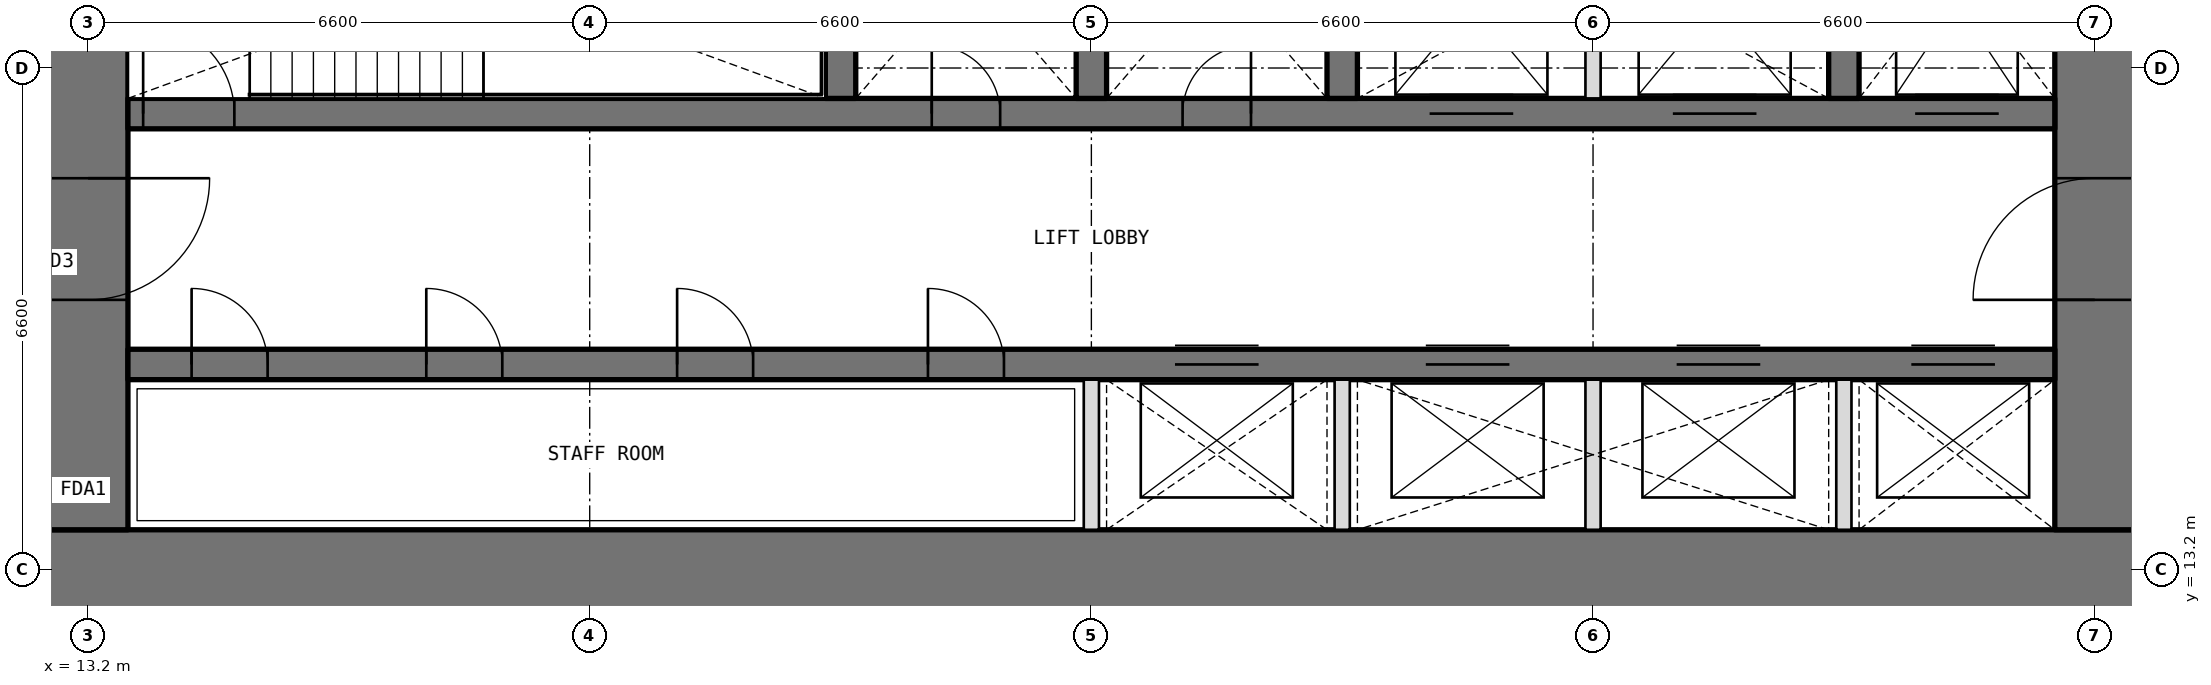
"""IFC4 building model, lengths in metres.
Left out: names, types, materials, properties, quantities, classifications, styles, units other than length and angle.
Written with IfcOpenShell. Run it as: python <this file> out.ifc"""

import sys

from ifc_helpers import new_model, si_unit, direction, frame, frame_2d, origin, place, context, subcontext, project, spatial, rectangle, extrude, element, fill, save


model = new_model("IFC4")
c1 = context("Model", 3, precision=1e-05, world=origin(), true_north=direction((0.0, 1.0)))
c2 = subcontext(c1, "Body", "Model", "MODEL_VIEW")
j1 = project(units=[si_unit("LENGTHUNIT", "METRE"), si_unit("PLANEANGLEUNIT", "RADIAN")], contexts=[c1])
p1 = place(None, origin())
s1 = spatial("IfcSite", under=j1, at=p1, CompositionType="ELEMENT")
p2 = place(p1, origin())
s2 = spatial("IfcBuilding", under=s1, at=p2, CompositionType="ELEMENT")
p3 = place(p2, frame((0.0, 0.0, 141.0)))
s3 = spatial("IfcBuildingStorey", under=s2, at=p3, CompositionType="ELEMENT", Elevation=141.0)
p4 = place(p3, frame((12.675, 13.2, 0.0), z_axis=(0.0, 0.0, 1.0), x_axis=(1.0, 0.0, 0.0)))
e1 = element("IfcWall", 1, at=p4, inside=s3, PredefinedType="SHEAR", context=c2, shape_type="SweptSolid", body=[
    extrude(rectangle(XDim=27.45, YDim=1.05, at=frame_2d((13.725, 0.0))), origin(), (0.0, 0.0, 1.0), 4.2),
])
p5 = place(p3, frame((39.6, 13.725, 0.0), z_axis=(0.0, 0.0, 1.0), x_axis=(0.0, 1.0, 0.0)))
e2 = element("IfcWall", 2, at=p5, inside=s3, PredefinedType="SHEAR", context=c2, shape_type="SweptSolid", body=[
    extrude(rectangle(XDim=18.75, YDim=1.05, at=frame_2d((9.375, 0.0))), origin(), (0.0, 0.0, 1.0), 4.2),
])
p6 = place(p5, frame((3.025, 0.0, 0.0)))
e3 = element("IfcOpeningElement", 3, at=p6, cuts=e2, PredefinedType="OPENING", context=c2, shape_type="SweptSolid", body=[
    extrude(rectangle(XDim=1.6, YDim=2.1, at=frame_2d((0.8, 1.05))), frame((0.0, 0.535, 0.0), z_axis=(0.0, -1.0, 0.0), x_axis=(1.0, 0.0, 0.0)), (0.0, 0.0, 1.0), 1.07),
])
p7 = place(p5, frame((13.825, 0.0, 0.0)))
e4 = element("IfcOpeningElement", 4, at=p7, cuts=e2, PredefinedType="OPENING", context=c2, shape_type="SweptSolid", body=[
    extrude(rectangle(XDim=1.6, YDim=2.1, at=frame_2d((0.8, 1.05))), frame((0.0, 0.535, 0.0), z_axis=(0.0, -1.0, 0.0), x_axis=(1.0, 0.0, 0.0)), (0.0, 0.0, 1.0), 1.07),
])
p8 = place(p3, frame((13.2, 32.475, 0.0), z_axis=(0.0, 0.0, 1.0), x_axis=(0.0, -1.0, 0.0)))
e5 = element("IfcWall", 5, at=p8, inside=s3, PredefinedType="SHEAR", context=c2, shape_type="SweptSolid", body=[
    extrude(rectangle(XDim=18.75, YDim=1.05, at=frame_2d((9.375, 0.0))), origin(), (0.0, 0.0, 1.0), 4.2),
])
p9 = place(p8, frame((14.125, 0.0, 0.0)))
e6 = element("IfcOpeningElement", 6, at=p9, cuts=e5, PredefinedType="OPENING", context=c2, shape_type="SweptSolid", body=[
    extrude(rectangle(XDim=1.6, YDim=2.1, at=frame_2d((0.8, 1.05))), frame((0.0, 0.535, 0.0), z_axis=(0.0, -1.0, 0.0), x_axis=(1.0, 0.0, 0.0)), (0.0, 0.0, 1.0), 1.07),
])
p10 = place(p8, frame((3.325, 0.0, 0.0)))
e7 = element("IfcOpeningElement", 7, at=p10, cuts=e5, PredefinedType="OPENING", context=c2, shape_type="SweptSolid", body=[
    extrude(rectangle(XDim=1.6, YDim=2.1, at=frame_2d((0.8, 1.05))), frame((0.0, 0.535, 0.0), z_axis=(0.0, -1.0, 0.0), x_axis=(1.0, 0.0, 0.0)), (0.0, 0.0, 1.0), 1.07),
])
p11 = place(p3, frame((13.725, 15.9, 0.0), z_axis=(0.0, 0.0, 1.0), x_axis=(1.0, 0.0, 0.0)))
e8 = element("IfcWall", 8, at=p11, inside=s3, PredefinedType="SHEAR", context=c2, shape_type="SweptSolid", body=[
    extrude(rectangle(XDim=25.35, YDim=0.4, at=frame_2d((12.675, 0.0))), origin(), (0.0, 0.0, 1.0), 4.2),
])
p12 = place(p11, frame((0.837, 0.0, 0.0)))
e9 = element("IfcOpeningElement", 9, at=p12, cuts=e8, PredefinedType="OPENING", context=c2, shape_type="SweptSolid", body=[
    extrude(rectangle(XDim=1.0, YDim=2.1, at=frame_2d((0.5, 1.05))), frame((0.0, 0.21, 0.0), z_axis=(0.0, -1.0, 0.0), x_axis=(1.0, 0.0, 0.0)), (0.0, 0.0, 1.0), 0.42),
])
p13 = place(p11, frame((3.925, 0.0, 0.0)))
e10 = element("IfcOpeningElement", 10, at=p13, cuts=e8, PredefinedType="OPENING", context=c2, shape_type="SweptSolid", body=[
    extrude(rectangle(XDim=1.0, YDim=2.1, at=frame_2d((0.5, 1.05))), frame((0.0, 0.21, 0.0), z_axis=(0.0, -1.0, 0.0), x_axis=(1.0, 0.0, 0.0)), (0.0, 0.0, 1.0), 0.42),
])
p14 = place(p11, frame((7.225, 0.0, 0.0)))
e11 = element("IfcOpeningElement", 11, at=p14, cuts=e8, PredefinedType="OPENING", context=c2, shape_type="SweptSolid", body=[
    extrude(rectangle(XDim=1.0, YDim=2.1, at=frame_2d((0.5, 1.05))), frame((0.0, 0.21, 0.0), z_axis=(0.0, -1.0, 0.0), x_axis=(1.0, 0.0, 0.0)), (0.0, 0.0, 1.0), 0.42),
])
p15 = place(p11, frame((10.525, 0.0, 0.0)))
e12 = element("IfcOpeningElement", 12, at=p15, cuts=e8, PredefinedType="OPENING", context=c2, shape_type="SweptSolid", body=[
    extrude(rectangle(XDim=1.0, YDim=2.1, at=frame_2d((0.5, 1.05))), frame((0.0, 0.21, 0.0), z_axis=(0.0, -1.0, 0.0), x_axis=(1.0, 0.0, 0.0)), (0.0, 0.0, 1.0), 0.42),
])
p16 = place(p11, frame((13.775, 0.0, 0.0)))
e13 = element("IfcOpeningElement", 13, at=p16, cuts=e8, PredefinedType="OPENING", context=c2, shape_type="SweptSolid", body=[
    extrude(rectangle(XDim=1.1, YDim=2.1, at=frame_2d((0.55, 1.05))), frame((0.0, 0.21, 0.0), z_axis=(0.0, -1.0, 0.0), x_axis=(1.0, 0.0, 0.0)), (0.0, 0.0, 1.0), 0.42),
])
p17 = place(p11, frame((17.075, 0.0, 0.0)))
e14 = element("IfcOpeningElement", 14, at=p17, cuts=e8, PredefinedType="OPENING", context=c2, shape_type="SweptSolid", body=[
    extrude(rectangle(XDim=1.1, YDim=2.1, at=frame_2d((0.55, 1.05))), frame((0.0, 0.21, 0.0), z_axis=(0.0, -1.0, 0.0), x_axis=(1.0, 0.0, 0.0)), (0.0, 0.0, 1.0), 0.42),
])
p18 = place(p11, frame((20.375, 0.0, 0.0)))
e15 = element("IfcOpeningElement", 15, at=p18, cuts=e8, PredefinedType="OPENING", context=c2, shape_type="SweptSolid", body=[
    extrude(rectangle(XDim=1.1, YDim=2.1, at=frame_2d((0.55, 1.05))), frame((0.0, 0.21, 0.0), z_axis=(0.0, -1.0, 0.0), x_axis=(1.0, 0.0, 0.0)), (0.0, 0.0, 1.0), 0.42),
])
p19 = place(p11, frame((23.462, 0.0, 0.0)))
e16 = element("IfcOpeningElement", 16, at=p19, cuts=e8, PredefinedType="OPENING", context=c2, shape_type="SweptSolid", body=[
    extrude(rectangle(XDim=1.1, YDim=2.1, at=frame_2d((0.55, 1.05))), frame((0.0, 0.21, 0.0), z_axis=(0.0, -1.0, 0.0), x_axis=(1.0, 0.0, 0.0)), (0.0, 0.0, 1.0), 0.42),
])
p20 = place(p3, frame((13.725, 19.2, 0.0), z_axis=(0.0, 0.0, 1.0), x_axis=(1.0, 0.0, 0.0)))
e17 = element("IfcWall", 17, at=p20, inside=s3, PredefinedType="SHEAR", context=c2, shape_type="SweptSolid", body=[
    extrude(rectangle(XDim=25.35, YDim=0.4, at=frame_2d((12.675, 0.0))), origin(), (0.0, 0.0, 1.0), 4.2),
])
p21 = place(p20, frame((10.575, 0.0, 0.0)))
e18 = element("IfcOpeningElement", 18, at=p21, cuts=e17, PredefinedType="OPENING", context=c2, shape_type="SweptSolid", body=[
    extrude(rectangle(XDim=0.9, YDim=2.1, at=frame_2d((0.45, 1.05))), frame((0.0, 0.21, 0.0), z_axis=(0.0, -1.0, 0.0), x_axis=(1.0, 0.0, 0.0)), (0.0, 0.0, 1.0), 0.42),
])
p22 = place(p20, frame((13.875, 0.0, 0.0)))
e19 = element("IfcOpeningElement", 19, at=p22, cuts=e17, PredefinedType="OPENING", context=c2, shape_type="SweptSolid", body=[
    extrude(rectangle(XDim=0.9, YDim=2.1, at=frame_2d((0.45, 1.05))), frame((0.0, 0.21, 0.0), z_axis=(0.0, -1.0, 0.0), x_axis=(1.0, 0.0, 0.0)), (0.0, 0.0, 1.0), 0.42),
])
p23 = place(p20, frame((0.2, 0.0, 0.0)))
e20 = element("IfcOpeningElement", 20, at=p23, cuts=e17, PredefinedType="OPENING", context=c2, shape_type="SweptSolid", body=[
    extrude(rectangle(XDim=1.2, YDim=2.1, at=frame_2d((0.6, 1.05))), frame((0.0, 0.21, 0.0), z_axis=(0.0, -1.0, 0.0), x_axis=(1.0, 0.0, 0.0)), (0.0, 0.0, 1.0), 0.42),
])
p24 = place(p20, frame((23.512, 0.0, 0.0)))
e21 = element("IfcOpeningElement", 21, at=p24, cuts=e17, PredefinedType="OPENING", context=c2, shape_type="SweptSolid", body=[
    extrude(rectangle(XDim=1.1, YDim=2.1, at=frame_2d((0.55, 1.05))), frame((0.0, 0.21, 0.0), z_axis=(0.0, -1.0, 0.0), x_axis=(1.0, 0.0, 0.0)), (0.0, 0.0, 1.0), 0.42),
])
p25 = place(p20, frame((17.125, 0.0, 0.0)))
e22 = element("IfcOpeningElement", 22, at=p25, cuts=e17, PredefinedType="OPENING", context=c2, shape_type="SweptSolid", body=[
    extrude(rectangle(XDim=1.1, YDim=2.1, at=frame_2d((0.55, 1.05))), frame((0.0, 0.21, 0.0), z_axis=(0.0, -1.0, 0.0), x_axis=(1.0, 0.0, 0.0)), (0.0, 0.0, 1.0), 0.42),
])
p26 = place(p20, frame((20.325, 0.0, 0.0)))
e23 = element("IfcOpeningElement", 23, at=p26, cuts=e17, PredefinedType="OPENING", context=c2, shape_type="SweptSolid", body=[
    extrude(rectangle(XDim=1.1, YDim=2.1, at=frame_2d((0.55, 1.05))), frame((0.0, 0.21, 0.0), z_axis=(0.0, -1.0, 0.0), x_axis=(1.0, 0.0, 0.0)), (0.0, 0.0, 1.0), 0.42),
])
for number, where, z_axis, x_axis in (
    (24, (23.1, 19.4, 0.0), (0.0, 0.0, 1.0), (0.0, 1.0, 0.0)),
    (25, (26.4, 19.4, 0.0), (0.0, 0.0, 1.0), (0.0, 1.0, 0.0)),
    (26, (29.7, 19.4, 0.0), (0.0, 0.0, 1.0), (0.0, 1.0, 0.0)),
    (27, (36.3, 19.4, 0.0), (0.0, 0.0, 1.0), (0.0, 1.0, 0.0)),
):
    element("IfcWall", number, at=place(p3, frame(where, z_axis=z_axis, x_axis=x_axis)), inside=s3, PredefinedType="SHEAR", context=c2, shape_type="SweptSolid", body=[
        extrude(rectangle(XDim=3.35, YDim=0.4, at=frame_2d((1.675, 0.0))), origin(), (0.0, 0.0, 1.0), 4.2),
    ])
for number, where, z_axis, x_axis in (
    (28, (26.4, 13.725, 0.0), (0.0, 0.0, 1.0), (0.0, 1.0, 0.0)),
    (29, (29.7, 13.725, 0.0), (0.0, 0.0, 1.0), (0.0, 1.0, 0.0)),
    (30, (33.0, 13.725, 0.0), (0.0, 0.0, 1.0), (0.0, 1.0, 0.0)),
    (31, (36.3, 13.725, 0.0), (0.0, 0.0, 1.0), (0.0, 1.0, 0.0)),
):
    element("IfcWall", number, at=place(p3, frame(where, z_axis=z_axis, x_axis=x_axis)), inside=s3, PredefinedType="PARTITIONING", context=c2, shape_type="SweptSolid", body=[
        extrude(rectangle(XDim=1.975, YDim=0.2, at=frame_2d((0.987, 0.0))), origin(), (0.0, 0.0, 1.0), 4.2),
    ])
p27 = place(p3, frame((33.0, 19.4, 0.0), z_axis=(0.0, 0.0, 1.0), x_axis=(0.0, 1.0, 0.0)))
e32 = element("IfcWall", 32, at=p27, inside=s3, PredefinedType="PARTITIONING", context=c2, shape_type="SweptSolid", body=[
    extrude(rectangle(XDim=3.35, YDim=0.2, at=frame_2d((1.675, 0.0))), origin(), (0.0, 0.0, 1.0), 4.2),
])
p28 = place(p21, origin())
e33 = element("IfcDoor", 33, at=p28, inside=s3, OperationType="SINGLE_SWING_LEFT", PredefinedType="DOOR", context=c2, shape_type="SweptSolid", body=[
    extrude(rectangle(XDim=0.9, YDim=2.1, at=frame_2d((0.45, 1.05))), frame((0.0, 0.025, 0.0), z_axis=(0.0, -1.0, 0.0), x_axis=(1.0, 0.0, 0.0)), (0.0, 0.0, 1.0), 0.05),
])
fill(e18, e33)
p29 = place(p22, origin())
e34 = element("IfcDoor", 34, at=p29, inside=s3, OperationType="SINGLE_SWING_RIGHT", PredefinedType="DOOR", context=c2, shape_type="SweptSolid", body=[
    extrude(rectangle(XDim=0.9, YDim=2.1, at=frame_2d((0.45, 1.05))), frame((0.0, 0.025, 0.0), z_axis=(0.0, -1.0, 0.0), x_axis=(1.0, 0.0, 0.0)), (0.0, 0.0, 1.0), 0.05),
])
fill(e19, e34)
p30 = place(p12, origin())
e35 = element("IfcDoor", 35, at=p30, inside=s3, OperationType="SINGLE_SWING_LEFT", PredefinedType="DOOR", context=c2, shape_type="SweptSolid", body=[
    extrude(rectangle(XDim=1.0, YDim=2.1, at=frame_2d((0.5, 1.05))), frame((0.0, 0.025, 0.0), z_axis=(0.0, -1.0, 0.0), x_axis=(1.0, 0.0, 0.0)), (0.0, 0.0, 1.0), 0.05),
])
fill(e9, e35)
p31 = place(p13, origin())
e36 = element("IfcDoor", 36, at=p31, inside=s3, OperationType="SINGLE_SWING_LEFT", PredefinedType="DOOR", context=c2, shape_type="SweptSolid", body=[
    extrude(rectangle(XDim=1.0, YDim=2.1, at=frame_2d((0.5, 1.05))), frame((0.0, 0.025, 0.0), z_axis=(0.0, -1.0, 0.0), x_axis=(1.0, 0.0, 0.0)), (0.0, 0.0, 1.0), 0.05),
])
fill(e10, e36)
p32 = place(p14, origin())
e37 = element("IfcDoor", 37, at=p32, inside=s3, OperationType="SINGLE_SWING_LEFT", PredefinedType="DOOR", context=c2, shape_type="SweptSolid", body=[
    extrude(rectangle(XDim=1.0, YDim=2.1, at=frame_2d((0.5, 1.05))), frame((0.0, 0.025, 0.0), z_axis=(0.0, -1.0, 0.0), x_axis=(1.0, 0.0, 0.0)), (0.0, 0.0, 1.0), 0.05),
])
fill(e11, e37)
p33 = place(p15, origin())
e38 = element("IfcDoor", 38, at=p33, inside=s3, OperationType="SINGLE_SWING_LEFT", PredefinedType="DOOR", context=c2, shape_type="SweptSolid", body=[
    extrude(rectangle(XDim=1.0, YDim=2.1, at=frame_2d((0.5, 1.05))), frame((0.0, 0.025, 0.0), z_axis=(0.0, -1.0, 0.0), x_axis=(1.0, 0.0, 0.0)), (0.0, 0.0, 1.0), 0.05),
])
fill(e12, e38)
p34 = place(p23, origin())
e39 = element("IfcDoor", 39, at=p34, inside=s3, OperationType="SINGLE_SWING_LEFT", PredefinedType="DOOR", context=c2, shape_type="SweptSolid", body=[
    extrude(rectangle(XDim=1.2, YDim=2.1, at=frame_2d((0.6, 1.05))), frame((0.0, 0.025, 0.0), z_axis=(0.0, -1.0, 0.0), x_axis=(1.0, 0.0, 0.0)), (0.0, 0.0, 1.0), 0.05),
])
fill(e20, e39)
p35 = place(p9, origin())
e40 = element("IfcDoor", 40, at=p35, inside=s3, OperationType="DOUBLE_DOOR_DOUBLE_SWING", PredefinedType="DOOR", context=c2, shape_type="SweptSolid", body=[
    extrude(rectangle(XDim=1.6, YDim=2.1, at=frame_2d((0.8, 1.05))), frame((0.0, 0.025, 0.0), z_axis=(0.0, -1.0, 0.0), x_axis=(1.0, 0.0, 0.0)), (0.0, 0.0, 1.0), 0.05),
])
fill(e6, e40)
p36 = place(p6, origin())
e41 = element("IfcDoor", 41, at=p36, inside=s3, OperationType="DOUBLE_DOOR_DOUBLE_SWING", PredefinedType="DOOR", context=c2, shape_type="SweptSolid", body=[
    extrude(rectangle(XDim=1.6, YDim=2.1, at=frame_2d((0.8, 1.05))), frame((0.0, 0.025, 0.0), z_axis=(0.0, -1.0, 0.0), x_axis=(1.0, 0.0, 0.0)), (0.0, 0.0, 1.0), 0.05),
])
fill(e3, e41)
p37 = place(p16, origin())
e42 = element("IfcDoor", 42, at=p37, inside=s3, OperationType="DOUBLE_DOOR_SLIDING", PredefinedType="DOOR", context=c2, shape_type="SweptSolid", body=[
    extrude(rectangle(XDim=1.1, YDim=2.1, at=frame_2d((0.55, 1.05))), frame((0.0, 0.025, 0.0), z_axis=(0.0, -1.0, 0.0), x_axis=(1.0, 0.0, 0.0)), (0.0, 0.0, 1.0), 0.05),
])
fill(e13, e42)
p38 = place(p17, origin())
e43 = element("IfcDoor", 43, at=p38, inside=s3, OperationType="DOUBLE_DOOR_SLIDING", PredefinedType="DOOR", context=c2, shape_type="SweptSolid", body=[
    extrude(rectangle(XDim=1.1, YDim=2.1, at=frame_2d((0.55, 1.05))), frame((0.0, 0.025, 0.0), z_axis=(0.0, -1.0, 0.0), x_axis=(1.0, 0.0, 0.0)), (0.0, 0.0, 1.0), 0.05),
])
fill(e14, e43)
p39 = place(p18, origin())
e44 = element("IfcDoor", 44, at=p39, inside=s3, OperationType="DOUBLE_DOOR_SLIDING", PredefinedType="DOOR", context=c2, shape_type="SweptSolid", body=[
    extrude(rectangle(XDim=1.1, YDim=2.1, at=frame_2d((0.55, 1.05))), frame((0.0, 0.025, 0.0), z_axis=(0.0, -1.0, 0.0), x_axis=(1.0, 0.0, 0.0)), (0.0, 0.0, 1.0), 0.05),
])
fill(e15, e44)
p40 = place(p19, origin())
e45 = element("IfcDoor", 45, at=p40, inside=s3, OperationType="DOUBLE_DOOR_SLIDING", PredefinedType="DOOR", context=c2, shape_type="SweptSolid", body=[
    extrude(rectangle(XDim=1.1, YDim=2.1, at=frame_2d((0.55, 1.05))), frame((0.0, 0.025, 0.0), z_axis=(0.0, -1.0, 0.0), x_axis=(1.0, 0.0, 0.0)), (0.0, 0.0, 1.0), 0.05),
])
fill(e16, e45)
p41 = place(p24, origin())
e46 = element("IfcDoor", 46, at=p41, inside=s3, OperationType="DOUBLE_DOOR_SLIDING", PredefinedType="DOOR", context=c2, shape_type="SweptSolid", body=[
    extrude(rectangle(XDim=1.1, YDim=2.1, at=frame_2d((0.55, 1.05))), frame((0.0, 0.025, 0.0), z_axis=(0.0, -1.0, 0.0), x_axis=(1.0, 0.0, 0.0)), (0.0, 0.0, 1.0), 0.05),
])
fill(e21, e46)
p42 = place(p25, origin())
e47 = element("IfcDoor", 47, at=p42, inside=s3, OperationType="DOUBLE_DOOR_SLIDING", PredefinedType="DOOR", context=c2, shape_type="SweptSolid", body=[
    extrude(rectangle(XDim=1.1, YDim=2.1, at=frame_2d((0.55, 1.05))), frame((0.0, 0.025, 0.0), z_axis=(0.0, -1.0, 0.0), x_axis=(1.0, 0.0, 0.0)), (0.0, 0.0, 1.0), 0.05),
])
fill(e22, e47)
p43 = place(p26, origin())
e48 = element("IfcDoor", 48, at=p43, inside=s3, OperationType="DOUBLE_DOOR_SLIDING", PredefinedType="DOOR", context=c2, shape_type="SweptSolid", body=[
    extrude(rectangle(XDim=1.1, YDim=2.1, at=frame_2d((0.55, 1.05))), frame((0.0, 0.025, 0.0), z_axis=(0.0, -1.0, 0.0), x_axis=(1.0, 0.0, 0.0)), (0.0, 0.0, 1.0), 0.05),
])
fill(e23, e48)
save(model, sys.argv[1])
